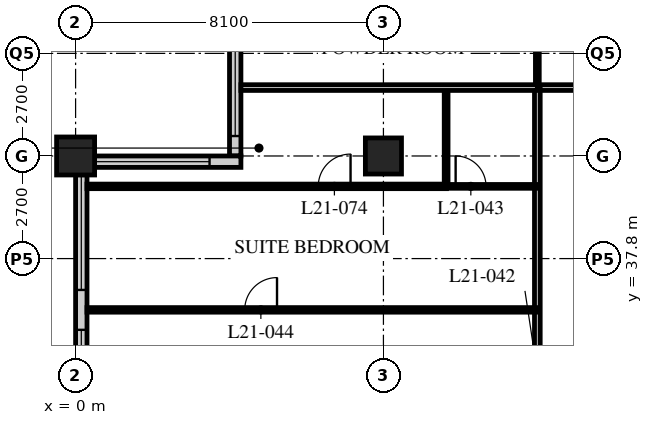
"""IFC4 building model, lengths in metres.
Left out: names, types, materials, properties, quantities, classifications, styles, units other than length and angle.
Written with IfcOpenShell. Run it as: python <this file> out.ifc"""

import sys

from ifc_helpers import new_model, si_unit, direction, frame, frame_2d, origin, origin_2d, place, context, subcontext, project, spatial, rectangle, hollow_rectangle, extrude, element, fill, save


model = new_model("IFC4")
c1 = context("Model", 3, precision=1e-05, world=origin(), true_north=direction((0.0, 1.0)))
c2 = subcontext(c1, "Body", "Model", "MODEL_VIEW")
j1 = project(units=[si_unit("LENGTHUNIT", "METRE"), si_unit("PLANEANGLEUNIT", "RADIAN")], contexts=[c1])
p1 = place(None, origin())
s1 = spatial("IfcSite", under=j1, at=p1, CompositionType="ELEMENT")
p2 = place(p1, origin())
s2 = spatial("IfcBuilding", under=s1, at=p2, CompositionType="ELEMENT")
p3 = place(p2, frame((0.0, 0.0, 84.0)))
s3 = spatial("IfcBuildingStorey", under=s2, at=p3, CompositionType="ELEMENT", Elevation=84.0)
p4 = place(p3, frame((0.0, 40.5, 0.0), z_axis=(0.0, 0.0, 1.0), x_axis=(1.0, 0.0, 0.0)))
e1 = element("IfcColumn", 1, at=p4, inside=s3, PredefinedType="COLUMN", context=c2, shape_type="SweptSolid", body=[
    extrude(hollow_rectangle(XDim=1.0, YDim=1.0, WallThickness=0.1, at=origin_2d()), origin(), (0.0, 0.0, 1.0), 3.4),
])
p5 = place(p3, frame((8.1, 40.5, 0.0), z_axis=(0.0, 0.0, 1.0), x_axis=(1.0, 0.0, 0.0)))
e2 = element("IfcColumn", 2, at=p5, inside=s3, PredefinedType="COLUMN", context=c2, shape_type="SweptSolid", body=[
    extrude(hollow_rectangle(XDim=0.95, YDim=0.95, WallThickness=0.095, at=origin_2d()), origin(), (0.0, 0.0, 1.0), 3.4),
])
p6 = place(p3, frame((4.2, 44.25, 0.0), z_axis=(0.0, 0.0, 1.0), x_axis=(0.0, -1.0, 0.0)))
e3 = element("IfcWall", 3, at=p6, inside=s3, PredefinedType="SOLIDWALL", context=c2, shape_type="SweptSolid", body=[
    extrude(rectangle(XDim=3.75, YDim=0.3, at=frame_2d((1.875, 0.0))), origin(), (0.0, 0.0, 1.0), 3.19),
])
p7 = place(p6, frame((0.225, 0.0, 0.9)))
e4 = element("IfcOpeningElement", 4, at=p7, cuts=e3, PredefinedType="OPENING", context=c2, shape_type="SweptSolid", body=[
    extrude(rectangle(XDim=3.0, YDim=1.5, at=frame_2d((1.5, 0.75))), frame((0.0, 0.16, 0.0), z_axis=(0.0, -1.0, 0.0), x_axis=(1.0, 0.0, 0.0)), (0.0, 0.0, 1.0), 0.32),
])
p8 = place(p3, frame((4.35, 40.35, 0.0), z_axis=(0.0, 0.0, 1.0), x_axis=(-1.0, 0.0, 0.0)))
e5 = element("IfcWall", 5, at=p8, inside=s3, PredefinedType="SOLIDWALL", context=c2, shape_type="SweptSolid", body=[
    extrude(rectangle(XDim=4.35, YDim=0.3, at=frame_2d((2.175, 0.0))), origin(), (0.0, 0.0, 1.0), 3.19),
])
p9 = place(p8, frame((0.825, 0.0, 0.9)))
e6 = element("IfcOpeningElement", 6, at=p9, cuts=e5, PredefinedType="OPENING", context=c2, shape_type="SweptSolid", body=[
    extrude(rectangle(XDim=3.0, YDim=1.5, at=frame_2d((1.5, 0.75))), frame((0.0, 0.16, 0.0), z_axis=(0.0, -1.0, 0.0), x_axis=(1.0, 0.0, 0.0)), (0.0, 0.0, 1.0), 0.32),
])
p10 = place(p3, frame((0.15, 40.2, 0.0), z_axis=(0.0, 0.0, 1.0), x_axis=(0.0, -1.0, 0.0)))
e7 = element("IfcWall", 7, at=p10, inside=s3, PredefinedType="SOLIDWALL", context=c2, shape_type="SweptSolid", body=[
    extrude(rectangle(XDim=32.1, YDim=0.3, at=frame_2d((16.05, 0.0))), origin(), (0.0, 0.0, 1.0), 3.19),
])
p11 = place(p10, frame((0.225, 0.0, 0.9)))
e8 = element("IfcOpeningElement", 8, at=p11, cuts=e7, PredefinedType="OPENING", context=c2, shape_type="SweptSolid", body=[
    extrude(rectangle(XDim=3.0, YDim=1.5, at=frame_2d((1.5, 0.75))), frame((0.0, 0.16, 0.0), z_axis=(0.0, -1.0, 0.0), x_axis=(1.0, 0.0, 0.0)), (0.0, 0.0, 1.0), 0.32),
])
p12 = place(p10, frame((4.275, 0.0, 0.9)))
e9 = element("IfcOpeningElement", 9, at=p12, cuts=e7, PredefinedType="OPENING", context=c2, shape_type="SweptSolid", body=[
    extrude(rectangle(XDim=3.0, YDim=1.5, at=frame_2d((1.5, 0.75))), frame((0.0, 0.16, 0.0), z_axis=(0.0, -1.0, 0.0), x_axis=(1.0, 0.0, 0.0)), (0.0, 0.0, 1.0), 0.32),
])
p13 = place(p10, frame((8.325, 0.0, 0.9)))
e10 = element("IfcOpeningElement", 10, at=p13, cuts=e7, PredefinedType="OPENING", context=c2, shape_type="SweptSolid", body=[
    extrude(rectangle(XDim=3.0, YDim=1.5, at=frame_2d((1.5, 0.75))), frame((0.0, 0.16, 0.0), z_axis=(0.0, -1.0, 0.0), x_axis=(1.0, 0.0, 0.0)), (0.0, 0.0, 1.0), 0.32),
])
p14 = place(p10, frame((12.375, 0.0, 0.9)))
e11 = element("IfcOpeningElement", 11, at=p14, cuts=e7, PredefinedType="OPENING", context=c2, shape_type="SweptSolid", body=[
    extrude(rectangle(XDim=3.0, YDim=1.5, at=frame_2d((1.5, 0.75))), frame((0.0, 0.16, 0.0), z_axis=(0.0, -1.0, 0.0), x_axis=(1.0, 0.0, 0.0)), (0.0, 0.0, 1.0), 0.32),
])
p15 = place(p10, frame((16.425, 0.0, 0.9)))
e12 = element("IfcOpeningElement", 12, at=p15, cuts=e7, PredefinedType="OPENING", context=c2, shape_type="SweptSolid", body=[
    extrude(rectangle(XDim=3.0, YDim=1.5, at=frame_2d((1.5, 0.75))), frame((0.0, 0.16, 0.0), z_axis=(0.0, -1.0, 0.0), x_axis=(1.0, 0.0, 0.0)), (0.0, 0.0, 1.0), 0.32),
])
p16 = place(p10, frame((20.475, 0.0, 0.9)))
e13 = element("IfcOpeningElement", 13, at=p16, cuts=e7, PredefinedType="OPENING", context=c2, shape_type="SweptSolid", body=[
    extrude(rectangle(XDim=3.0, YDim=1.5, at=frame_2d((1.5, 0.75))), frame((0.0, 0.16, 0.0), z_axis=(0.0, -1.0, 0.0), x_axis=(1.0, 0.0, 0.0)), (0.0, 0.0, 1.0), 0.32),
])
p17 = place(p10, frame((24.525, 0.0, 0.9)))
e14 = element("IfcOpeningElement", 14, at=p17, cuts=e7, PredefinedType="OPENING", context=c2, shape_type="SweptSolid", body=[
    extrude(rectangle(XDim=3.0, YDim=1.5, at=frame_2d((1.5, 0.75))), frame((0.0, 0.16, 0.0), z_axis=(0.0, -1.0, 0.0), x_axis=(1.0, 0.0, 0.0)), (0.0, 0.0, 1.0), 0.32),
])
p18 = place(p10, frame((28.575, 0.0, 0.9)))
e15 = element("IfcOpeningElement", 15, at=p18, cuts=e7, PredefinedType="OPENING", context=c2, shape_type="SweptSolid", body=[
    extrude(rectangle(XDim=3.0, YDim=1.5, at=frame_2d((1.5, 0.75))), frame((0.0, 0.16, 0.0), z_axis=(0.0, -1.0, 0.0), x_axis=(1.0, 0.0, 0.0)), (0.0, 0.0, 1.0), 0.32),
])
p19 = place(p3, frame((12.15, 42.3, 0.0), z_axis=(0.0, 0.0, 1.0), x_axis=(1.0, 0.0, 0.0)))
e16 = element("IfcWall", 16, at=p19, inside=s3, PredefinedType="PARTITIONING", context=c2, shape_type="SweptSolid", body=[
    extrude(rectangle(XDim=32.4, YDim=0.15, at=frame_2d((16.2, 0.0))), origin(), (0.0, 0.0, 1.0), 3.19),
])
p20 = place(p19, frame((5.95, 0.0, 0.0)))
e17 = element("IfcOpeningElement", 17, at=p20, cuts=e16, PredefinedType="OPENING", context=c2, shape_type="SweptSolid", body=[
    extrude(rectangle(XDim=1.0, YDim=2.1, at=frame_2d((0.5, 1.05))), frame((0.0, 0.085, 0.0), z_axis=(0.0, -1.0, 0.0), x_axis=(1.0, 0.0, 0.0)), (0.0, 0.0, 1.0), 0.17),
])
p21 = place(p19, frame((14.6, 0.0, 0.0)))
e18 = element("IfcOpeningElement", 18, at=p21, cuts=e16, PredefinedType="OPENING", context=c2, shape_type="SweptSolid", body=[
    extrude(rectangle(XDim=1.0, YDim=2.1, at=frame_2d((0.5, 1.05))), frame((0.0, 0.085, 0.0), z_axis=(0.0, -1.0, 0.0), x_axis=(1.0, 0.0, 0.0)), (0.0, 0.0, 1.0), 0.17),
])
p22 = place(p19, frame((18.65, 0.0, 0.0)))
e19 = element("IfcOpeningElement", 19, at=p22, cuts=e16, PredefinedType="OPENING", context=c2, shape_type="SweptSolid", body=[
    extrude(rectangle(XDim=1.0, YDim=2.1, at=frame_2d((0.5, 1.05))), frame((0.0, 0.085, 0.0), z_axis=(0.0, -1.0, 0.0), x_axis=(1.0, 0.0, 0.0)), (0.0, 0.0, 1.0), 0.17),
])
p23 = place(p19, frame((22.15, 0.0, 0.0)))
e20 = element("IfcOpeningElement", 20, at=p23, cuts=e16, PredefinedType="OPENING", context=c2, shape_type="SweptSolid", body=[
    extrude(rectangle(XDim=1.0, YDim=2.1, at=frame_2d((0.5, 1.05))), frame((0.0, 0.085, 0.0), z_axis=(0.0, -1.0, 0.0), x_axis=(1.0, 0.0, 0.0)), (0.0, 0.0, 1.0), 0.17),
])
p24 = place(p19, frame((29.025, 0.0, 0.0)))
e21 = element("IfcOpeningElement", 21, at=p24, cuts=e16, PredefinedType="OPENING", context=c2, shape_type="SweptSolid", body=[
    extrude(rectangle(XDim=1.0, YDim=2.1, at=frame_2d((0.5, 1.05))), frame((0.0, 0.085, 0.0), z_axis=(0.0, -1.0, 0.0), x_axis=(1.0, 0.0, 0.0)), (0.0, 0.0, 1.0), 0.17),
])
p25 = place(p19, frame((2.375, 0.0, 0.0)))
e22 = element("IfcOpeningElement", 22, at=p25, cuts=e16, PredefinedType="OPENING", context=c2, shape_type="SweptSolid", body=[
    extrude(rectangle(XDim=1.0, YDim=2.1, at=frame_2d((0.5, 1.05))), frame((0.0, 0.085, 0.0), z_axis=(0.0, -1.0, 0.0), x_axis=(1.0, 0.0, 0.0)), (0.0, 0.0, 1.0), 0.17),
])
p26 = place(p3, frame((12.15, 16.2, 0.0), z_axis=(0.0, 0.0, 1.0), x_axis=(0.0, 1.0, 0.0)))
e23 = element("IfcWall", 23, at=p26, inside=s3, PredefinedType="PARTITIONING", context=c2, shape_type="SweptSolid", body=[
    extrude(rectangle(XDim=26.1, YDim=0.15, at=frame_2d((13.05, 0.0))), origin(), (0.0, 0.0, 1.0), 3.19),
])
p27 = place(p26, frame((2.45, 0.0, 0.0)))
e24 = element("IfcOpeningElement", 24, at=p27, cuts=e23, PredefinedType="OPENING", context=c2, shape_type="SweptSolid", body=[
    extrude(rectangle(XDim=1.0, YDim=2.1, at=frame_2d((0.5, 1.05))), frame((0.0, 0.085, 0.0), z_axis=(0.0, -1.0, 0.0), x_axis=(1.0, 0.0, 0.0)), (0.0, 0.0, 1.0), 0.17),
])
p28 = place(p26, frame((6.5, 0.0, 0.0)))
e25 = element("IfcOpeningElement", 25, at=p28, cuts=e23, PredefinedType="OPENING", context=c2, shape_type="SweptSolid", body=[
    extrude(rectangle(XDim=1.0, YDim=2.1, at=frame_2d((0.5, 1.05))), frame((0.0, 0.085, 0.0), z_axis=(0.0, -1.0, 0.0), x_axis=(1.0, 0.0, 0.0)), (0.0, 0.0, 1.0), 0.17),
])
p29 = place(p26, frame((10.0, 0.0, 0.0)))
e26 = element("IfcOpeningElement", 26, at=p29, cuts=e23, PredefinedType="OPENING", context=c2, shape_type="SweptSolid", body=[
    extrude(rectangle(XDim=1.0, YDim=2.1, at=frame_2d((0.5, 1.05))), frame((0.0, 0.085, 0.0), z_axis=(0.0, -1.0, 0.0), x_axis=(1.0, 0.0, 0.0)), (0.0, 0.0, 1.0), 0.17),
])
p30 = place(p26, frame((18.1, 0.0, 0.0)))
e27 = element("IfcOpeningElement", 27, at=p30, cuts=e23, PredefinedType="OPENING", context=c2, shape_type="SweptSolid", body=[
    extrude(rectangle(XDim=1.0, YDim=2.1, at=frame_2d((0.5, 1.05))), frame((0.0, 0.085, 0.0), z_axis=(0.0, -1.0, 0.0), x_axis=(1.0, 0.0, 0.0)), (0.0, 0.0, 1.0), 0.17),
])
p31 = place(p3, frame((9.75, 39.7, 0.0), z_axis=(0.0, 0.0, 1.0), x_axis=(0.0, 1.0, 0.0)))
e28 = element("IfcWall", 28, at=p31, inside=s3, PredefinedType="PARTITIONING", context=c2, shape_type="SweptSolid", body=[
    extrude(rectangle(XDim=2.6, YDim=0.1, at=frame_2d((1.3, 0.0))), origin(), (0.0, 0.0, 1.0), 3.19),
])
p32 = place(p3, frame((12.15, 39.7, 0.0), z_axis=(0.0, 0.0, 1.0), x_axis=(-1.0, 0.0, 0.0)))
e29 = element("IfcWall", 29, at=p32, inside=s3, PredefinedType="PARTITIONING", context=c2, shape_type="SweptSolid", body=[
    extrude(rectangle(XDim=2.4, YDim=0.1, at=frame_2d((1.2, 0.0))), origin(), (0.0, 0.0, 1.0), 3.19),
])
p33 = place(p32, frame((1.35, 0.0, 0.0)))
e30 = element("IfcOpeningElement", 30, at=p33, cuts=e29, PredefinedType="OPENING", context=c2, shape_type="SweptSolid", body=[
    extrude(rectangle(XDim=0.8, YDim=2.1, at=frame_2d((0.4, 1.05))), frame((0.0, 0.06, 0.0), z_axis=(0.0, -1.0, 0.0), x_axis=(1.0, 0.0, 0.0)), (0.0, 0.0, 1.0), 0.12),
])
p34 = place(p3, frame((12.15, 36.45, 0.0), z_axis=(0.0, 0.0, 1.0), x_axis=(-1.0, 0.0, 0.0)))
e31 = element("IfcWall", 31, at=p34, inside=s3, PredefinedType="PARTITIONING", context=c2, shape_type="SweptSolid", body=[
    extrude(rectangle(XDim=11.85, YDim=0.12, at=frame_2d((5.925, 0.0))), origin(), (0.0, 0.0, 1.0), 3.19),
])
p35 = place(p34, frame((6.85, 0.0, 0.0)))
e32 = element("IfcOpeningElement", 32, at=p35, cuts=e31, PredefinedType="OPENING", context=c2, shape_type="SweptSolid", body=[
    extrude(rectangle(XDim=0.85, YDim=2.1, at=frame_2d((0.425, 1.05))), frame((0.0, 0.07, 0.0), z_axis=(0.0, -1.0, 0.0), x_axis=(1.0, 0.0, 0.0)), (0.0, 0.0, 1.0), 0.14),
])
p36 = place(p3, frame((12.15, 42.3, 0.0), z_axis=(0.0, 0.0, 1.0), x_axis=(0.0, 1.0, 0.0)))
e33 = element("IfcWall", 33, at=p36, inside=s3, PredefinedType="PARTITIONING", context=c2, shape_type="SweptSolid", body=[
    extrude(rectangle(XDim=2.4, YDim=0.1, at=frame_2d((1.2, 0.0))), origin(), (0.0, 0.0, 1.0), 3.19),
])
p37 = place(p3, frame((4.35, 42.3, 0.0), z_axis=(0.0, 0.0, 1.0), x_axis=(1.0, 0.0, 0.0)))
e34 = element("IfcWall", 34, at=p37, inside=s3, PredefinedType="PARTITIONING", context=c2, shape_type="SweptSolid", body=[
    extrude(rectangle(XDim=7.8, YDim=0.15, at=frame_2d((3.9, 0.0))), origin(), (0.0, 0.0, 1.0), 3.19),
])
p38 = place(p3, frame((9.76, 39.7, 0.0), z_axis=(0.0, 0.0, 1.0), x_axis=(-1.0, 0.0, 0.0)))
e35 = element("IfcWall", 35, at=p38, inside=s3, PredefinedType="PARTITIONING", context=c2, shape_type="SweptSolid", body=[
    extrude(rectangle(XDim=9.46, YDim=0.12, at=frame_2d((4.73, 0.0))), origin(), (0.0, 0.0, 1.0), 3.19),
])
p39 = place(p38, frame((2.525, 0.0, 0.0)))
e36 = element("IfcOpeningElement", 36, at=p39, cuts=e35, PredefinedType="OPENING", context=c2, shape_type="SweptSolid", body=[
    extrude(rectangle(XDim=0.85, YDim=2.1, at=frame_2d((0.425, 1.05))), frame((0.0, 0.07, 0.0), z_axis=(0.0, -1.0, 0.0), x_axis=(1.0, 0.0, 0.0)), (0.0, 0.0, 1.0), 0.14),
])
p40 = place(p7, origin())
e37 = element("IfcWindow", 37, at=p40, inside=s3, PartitioningType="SINGLE_PANEL", PredefinedType="WINDOW", context=c2, shape_type="SweptSolid", body=[
    extrude(rectangle(XDim=3.0, YDim=1.5, at=frame_2d((1.5, 0.75))), frame((0.0, 0.03, 0.0), z_axis=(0.0, -1.0, 0.0), x_axis=(1.0, 0.0, 0.0)), (0.0, 0.0, 1.0), 0.06),
])
fill(e4, e37)
p41 = place(p9, origin())
e38 = element("IfcWindow", 38, at=p41, inside=s3, PartitioningType="SINGLE_PANEL", PredefinedType="WINDOW", context=c2, shape_type="SweptSolid", body=[
    extrude(rectangle(XDim=3.0, YDim=1.5, at=frame_2d((1.5, 0.75))), frame((0.0, 0.03, 0.0), z_axis=(0.0, -1.0, 0.0), x_axis=(1.0, 0.0, 0.0)), (0.0, 0.0, 1.0), 0.06),
])
fill(e6, e38)
p42 = place(p11, origin())
e39 = element("IfcWindow", 39, at=p42, inside=s3, PartitioningType="SINGLE_PANEL", PredefinedType="WINDOW", context=c2, shape_type="SweptSolid", body=[
    extrude(rectangle(XDim=3.0, YDim=1.5, at=frame_2d((1.5, 0.75))), frame((0.0, 0.03, 0.0), z_axis=(0.0, -1.0, 0.0), x_axis=(1.0, 0.0, 0.0)), (0.0, 0.0, 1.0), 0.06),
])
fill(e8, e39)
p43 = place(p12, origin())
e40 = element("IfcWindow", 40, at=p43, inside=s3, PartitioningType="SINGLE_PANEL", PredefinedType="WINDOW", context=c2, shape_type="SweptSolid", body=[
    extrude(rectangle(XDim=3.0, YDim=1.5, at=frame_2d((1.5, 0.75))), frame((0.0, 0.03, 0.0), z_axis=(0.0, -1.0, 0.0), x_axis=(1.0, 0.0, 0.0)), (0.0, 0.0, 1.0), 0.06),
])
fill(e9, e40)
p44 = place(p33, origin())
e41 = element("IfcDoor", 41, at=p44, inside=s3, OperationType="SINGLE_SWING_LEFT", PredefinedType="DOOR", context=c2, shape_type="SweptSolid", body=[
    extrude(rectangle(XDim=0.8, YDim=2.1, at=frame_2d((0.4, 1.05))), frame((0.0, 0.025, 0.0), z_axis=(0.0, -1.0, 0.0), x_axis=(1.0, 0.0, 0.0)), (0.0, 0.0, 1.0), 0.05),
])
fill(e30, e41)
p45 = place(p35, origin())
e42 = element("IfcDoor", 42, at=p45, inside=s3, OperationType="SINGLE_SWING_RIGHT", PredefinedType="DOOR", context=c2, shape_type="SweptSolid", body=[
    extrude(rectangle(XDim=0.85, YDim=2.1, at=frame_2d((0.425, 1.05))), frame((0.0, 0.025, 0.0), z_axis=(0.0, -1.0, 0.0), x_axis=(1.0, 0.0, 0.0)), (0.0, 0.0, 1.0), 0.05),
])
fill(e32, e42)
p46 = place(p39, origin())
e43 = element("IfcDoor", 43, at=p46, inside=s3, OperationType="SINGLE_SWING_RIGHT", PredefinedType="DOOR", context=c2, shape_type="SweptSolid", body=[
    extrude(rectangle(XDim=0.85, YDim=2.1, at=frame_2d((0.425, 1.05))), frame((0.0, 0.025, 0.0), z_axis=(0.0, -1.0, 0.0), x_axis=(1.0, 0.0, 0.0)), (0.0, 0.0, 1.0), 0.05),
])
fill(e36, e43)
save(model, sys.argv[1])
